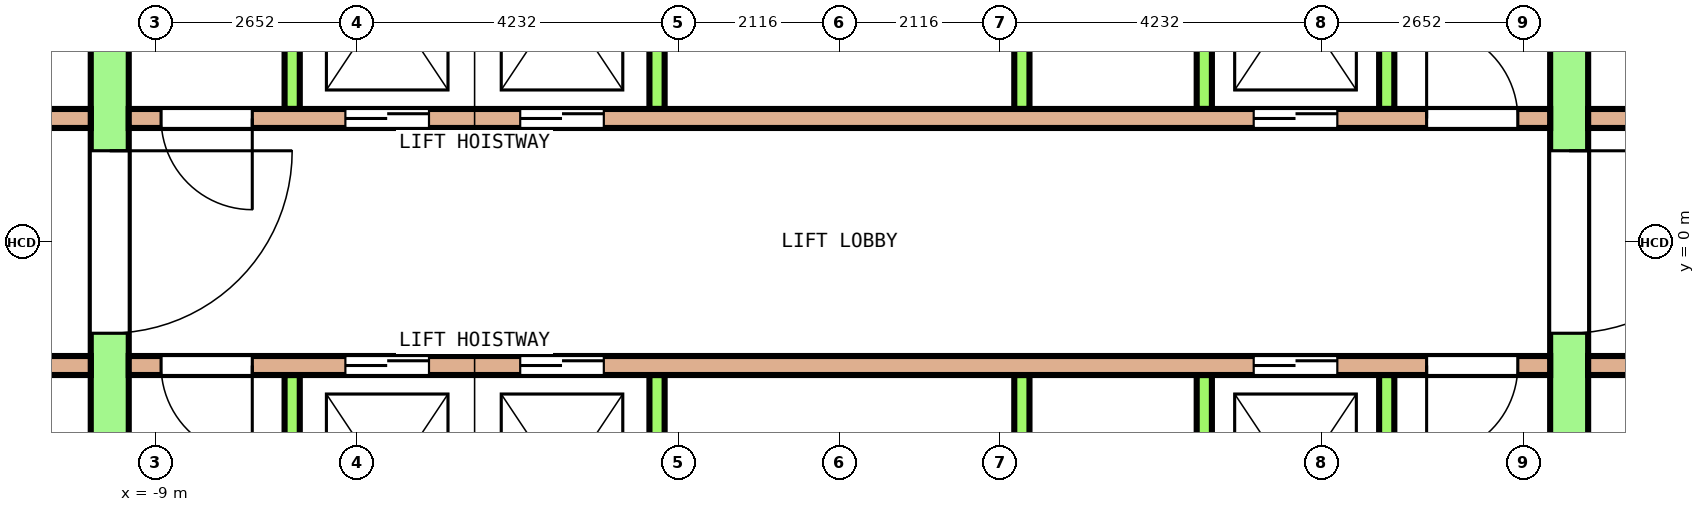
"""IFC4 building model, lengths in metres.
Left out: names, types, materials, properties, quantities, classifications, styles, units other than length and angle.
Written with IfcOpenShell. Run it as: python <this file> out.ifc"""

import sys

from ifc_helpers import new_model, si_unit, direction, frame, frame_2d, origin, place, context, subcontext, project, spatial, rectangle, extrude, element, fill, save


model = new_model("IFC4")
c1 = context("Model", 3, precision=1e-05, world=origin(), true_north=direction((0.0, 1.0)))
c2 = subcontext(c1, "Body", "Model", "MODEL_VIEW")
j1 = project(units=[si_unit("LENGTHUNIT", "METRE"), si_unit("PLANEANGLEUNIT", "RADIAN")], contexts=[c1])
p1 = place(None, origin())
s1 = spatial("IfcSite", under=j1, at=p1, CompositionType="ELEMENT")
p2 = place(p1, origin())
s2 = spatial("IfcBuilding", under=s1, at=p2, CompositionType="ELEMENT")
p3 = place(p2, frame((0.0, 0.0, 202.4)))
s3 = spatial("IfcBuildingStorey", under=s2, at=p3, CompositionType="ELEMENT", Elevation=202.4)
p4 = place(p3, frame((-9.6, -7.8, 0.0), z_axis=(0.0, 0.0, 1.0), x_axis=(0.0, 1.0, 0.0)))
e1 = element("IfcWall", 1, at=p4, inside=s3, PredefinedType="SHEAR", context=c2, shape_type="SweptSolid", body=[
    extrude(rectangle(XDim=15.6, YDim=0.5, at=frame_2d((7.8, 0.0))), origin(), (0.0, 0.0, 1.0), 8.7),
])
p5 = place(p4, frame((6.6, 0.0, 0.0)))
e2 = element("IfcOpeningElement", 2, at=p5, cuts=e1, PredefinedType="OPENING", context=c2, shape_type="SweptSolid", body=[
    extrude(rectangle(XDim=2.4, YDim=2.1, at=frame_2d((1.2, 1.05))), frame((0.0, 0.26, 0.0), z_axis=(0.0, -1.0, 0.0), x_axis=(1.0, 0.0, 0.0)), (0.0, 0.0, 1.0), 0.52),
])
p6 = place(p4, frame((13.5, 0.0, 0.0)))
e3 = element("IfcOpeningElement", 3, at=p6, cuts=e1, PredefinedType="OPENING", context=c2, shape_type="SweptSolid", body=[
    extrude(rectangle(XDim=1.2, YDim=2.1, at=frame_2d((0.6, 1.05))), frame((0.0, 0.26, 0.0), z_axis=(0.0, -1.0, 0.0), x_axis=(1.0, 0.0, 0.0)), (0.0, 0.0, 1.0), 0.52),
])
p7 = place(p4, frame((0.9, 0.0, 0.0)))
e4 = element("IfcOpeningElement", 4, at=p7, cuts=e1, PredefinedType="OPENING", context=c2, shape_type="SweptSolid", body=[
    extrude(rectangle(XDim=1.2, YDim=2.1, at=frame_2d((0.6, 1.05))), frame((0.0, 0.26, 0.0), z_axis=(0.0, -1.0, 0.0), x_axis=(1.0, 0.0, 0.0)), (0.0, 0.0, 1.0), 0.52),
])
p8 = place(p3, frame((9.6, -7.8, 0.0), z_axis=(0.0, 0.0, 1.0), x_axis=(0.0, 1.0, 0.0)))
e5 = element("IfcWall", 5, at=p8, inside=s3, PredefinedType="SHEAR", context=c2, shape_type="SweptSolid", body=[
    extrude(rectangle(XDim=15.6, YDim=0.5, at=frame_2d((7.8, 0.0))), origin(), (0.0, 0.0, 1.0), 8.7),
])
p9 = place(p8, frame((6.6, 0.0, 0.0)))
e6 = element("IfcOpeningElement", 6, at=p9, cuts=e5, PredefinedType="OPENING", context=c2, shape_type="SweptSolid", body=[
    extrude(rectangle(XDim=2.4, YDim=2.1, at=frame_2d((1.2, 1.05))), frame((0.0, 0.26, 0.0), z_axis=(0.0, -1.0, 0.0), x_axis=(1.0, 0.0, 0.0)), (0.0, 0.0, 1.0), 0.52),
])
p10 = place(p8, frame((13.5, 0.0, 0.0)))
e7 = element("IfcOpeningElement", 7, at=p10, cuts=e5, PredefinedType="OPENING", context=c2, shape_type="SweptSolid", body=[
    extrude(rectangle(XDim=1.2, YDim=2.1, at=frame_2d((0.6, 1.05))), frame((0.0, 0.26, 0.0), z_axis=(0.0, -1.0, 0.0), x_axis=(1.0, 0.0, 0.0)), (0.0, 0.0, 1.0), 0.52),
])
p11 = place(p8, frame((1.0, 0.0, 0.0)))
e8 = element("IfcOpeningElement", 8, at=p11, cuts=e5, PredefinedType="OPENING", context=c2, shape_type="SweptSolid", body=[
    extrude(rectangle(XDim=1.0, YDim=2.1, at=frame_2d((0.5, 1.05))), frame((0.0, 0.26, 0.0), z_axis=(0.0, -1.0, 0.0), x_axis=(1.0, 0.0, 0.0)), (0.0, 0.0, 1.0), 0.52),
])
p12 = place(p3, frame((-12.9, 1.625, 0.0), z_axis=(0.0, 0.0, 1.0), x_axis=(1.0, 0.0, 0.0)))
e9 = element("IfcWall", 9, at=p12, inside=s3, PredefinedType="SOLIDWALL", context=c2, shape_type="SweptSolid", body=[
    extrude(rectangle(XDim=3.05, YDim=0.25, at=frame_2d((1.525, 0.0))), origin(), (0.0, 0.0, 1.0), 8.7),
])
p13 = place(p12, frame((0.925, 0.0, 0.0)))
e10 = element("IfcOpeningElement", 10, at=p13, cuts=e9, PredefinedType="OPENING", context=c2, shape_type="SweptSolid", body=[
    extrude(rectangle(XDim=1.2, YDim=2.1, at=frame_2d((0.6, 1.05))), frame((0.0, 0.135, 0.0), z_axis=(0.0, -1.0, 0.0), x_axis=(1.0, 0.0, 0.0)), (0.0, 0.0, 1.0), 0.27),
])
p14 = place(p3, frame((-9.35, 1.625, 0.0), z_axis=(0.0, 0.0, 1.0), x_axis=(1.0, 0.0, 0.0)))
e11 = element("IfcWall", 11, at=p14, inside=s3, PredefinedType="SOLIDWALL", context=c2, shape_type="SweptSolid", body=[
    extrude(rectangle(XDim=18.7, YDim=0.25, at=frame_2d((9.35, 0.0))), origin(), (0.0, 0.0, 1.0), 8.7),
])
p15 = place(p14, frame((2.85, 0.0, 0.0)))
e12 = element("IfcOpeningElement", 12, at=p15, cuts=e11, PredefinedType="OPENING", context=c2, shape_type="SweptSolid", body=[
    extrude(rectangle(XDim=1.1, YDim=2.1, at=frame_2d((0.55, 1.05))), frame((0.0, 0.135, 0.0), z_axis=(0.0, -1.0, 0.0), x_axis=(1.0, 0.0, 0.0)), (0.0, 0.0, 1.0), 0.27),
])
p16 = place(p14, frame((5.15, 0.0, 0.0)))
e13 = element("IfcOpeningElement", 13, at=p16, cuts=e11, PredefinedType="OPENING", context=c2, shape_type="SweptSolid", body=[
    extrude(rectangle(XDim=1.1, YDim=2.1, at=frame_2d((0.55, 1.05))), frame((0.0, 0.135, 0.0), z_axis=(0.0, -1.0, 0.0), x_axis=(1.0, 0.0, 0.0)), (0.0, 0.0, 1.0), 0.27),
])
p17 = place(p14, frame((14.8, 0.0, 0.0)))
e14 = element("IfcOpeningElement", 14, at=p17, cuts=e11, PredefinedType="OPENING", context=c2, shape_type="SweptSolid", body=[
    extrude(rectangle(XDim=1.1, YDim=2.1, at=frame_2d((0.55, 1.05))), frame((0.0, 0.135, 0.0), z_axis=(0.0, -1.0, 0.0), x_axis=(1.0, 0.0, 0.0)), (0.0, 0.0, 1.0), 0.27),
])
p18 = place(p14, frame((0.425, 0.0, 0.0)))
e15 = element("IfcOpeningElement", 15, at=p18, cuts=e11, PredefinedType="OPENING", context=c2, shape_type="SweptSolid", body=[
    extrude(rectangle(XDim=1.2, YDim=2.1, at=frame_2d((0.6, 1.05))), frame((0.0, 0.135, 0.0), z_axis=(0.0, -1.0, 0.0), x_axis=(1.0, 0.0, 0.0)), (0.0, 0.0, 1.0), 0.27),
])
p19 = place(p14, frame((17.075, 0.0, 0.0)))
e16 = element("IfcOpeningElement", 16, at=p19, cuts=e11, PredefinedType="OPENING", context=c2, shape_type="SweptSolid", body=[
    extrude(rectangle(XDim=1.2, YDim=2.1, at=frame_2d((0.6, 1.05))), frame((0.0, 0.135, 0.0), z_axis=(0.0, -1.0, 0.0), x_axis=(1.0, 0.0, 0.0)), (0.0, 0.0, 1.0), 0.27),
])
p20 = place(p3, frame((9.85, 1.625, 0.0), z_axis=(0.0, 0.0, 1.0), x_axis=(1.0, 0.0, 0.0)))
e17 = element("IfcWall", 17, at=p20, inside=s3, PredefinedType="SOLIDWALL", context=c2, shape_type="SweptSolid", body=[
    extrude(rectangle(XDim=3.05, YDim=0.25, at=frame_2d((1.525, 0.0))), origin(), (0.0, 0.0, 1.0), 8.7),
])
p21 = place(p20, frame((0.925, 0.0, 0.0)))
e18 = element("IfcOpeningElement", 18, at=p21, cuts=e17, PredefinedType="OPENING", context=c2, shape_type="SweptSolid", body=[
    extrude(rectangle(XDim=1.2, YDim=2.1, at=frame_2d((0.6, 1.05))), frame((0.0, 0.135, 0.0), z_axis=(0.0, -1.0, 0.0), x_axis=(1.0, 0.0, 0.0)), (0.0, 0.0, 1.0), 0.27),
])
for number, where, z_axis, x_axis in (
    (19, (-7.2, 1.75, 0.0), (0.0, 0.0, 1.0), (0.0, 1.0, 0.0)),
    (20, (-2.4, 1.75, 0.0), (0.0, 0.0, 1.0), (0.0, 1.0, 0.0)),
    (21, (2.4, 1.75, 0.0), (0.0, 0.0, 1.0), (0.0, 1.0, 0.0)),
    (22, (4.8, 1.75, 0.0), (0.0, 0.0, 1.0), (0.0, 1.0, 0.0)),
    (23, (7.2, 1.75, 0.0), (0.0, 0.0, 1.0), (0.0, 1.0, 0.0)),
):
    element("IfcWall", number, at=place(p3, frame(where, z_axis=z_axis, x_axis=x_axis)), inside=s3, PredefinedType="SOLIDWALL", context=c2, shape_type="SweptSolid", body=[
        extrude(rectangle(XDim=2.9, YDim=0.2, at=frame_2d((1.45, 0.0))), origin(), (0.0, 0.0, 1.0), 8.7),
    ])
p22 = place(p3, frame((-12.9, -1.625, 0.0), z_axis=(0.0, 0.0, 1.0), x_axis=(1.0, 0.0, 0.0)))
e24 = element("IfcWall", 24, at=p22, inside=s3, PredefinedType="SOLIDWALL", context=c2, shape_type="SweptSolid", body=[
    extrude(rectangle(XDim=3.05, YDim=0.25, at=frame_2d((1.525, 0.0))), origin(), (0.0, 0.0, 1.0), 8.7),
])
p23 = place(p22, frame((0.925, 0.0, 0.0)))
e25 = element("IfcOpeningElement", 25, at=p23, cuts=e24, PredefinedType="OPENING", context=c2, shape_type="SweptSolid", body=[
    extrude(rectangle(XDim=1.2, YDim=2.1, at=frame_2d((0.6, 1.05))), frame((0.0, 0.135, 0.0), z_axis=(0.0, -1.0, 0.0), x_axis=(1.0, 0.0, 0.0)), (0.0, 0.0, 1.0), 0.27),
])
p24 = place(p3, frame((-9.35, -1.625, 0.0), z_axis=(0.0, 0.0, 1.0), x_axis=(1.0, 0.0, 0.0)))
e26 = element("IfcWall", 26, at=p24, inside=s3, PredefinedType="SOLIDWALL", context=c2, shape_type="SweptSolid", body=[
    extrude(rectangle(XDim=18.7, YDim=0.25, at=frame_2d((9.35, 0.0))), origin(), (0.0, 0.0, 1.0), 8.7),
])
p25 = place(p24, frame((2.85, 0.0, 0.0)))
e27 = element("IfcOpeningElement", 27, at=p25, cuts=e26, PredefinedType="OPENING", context=c2, shape_type="SweptSolid", body=[
    extrude(rectangle(XDim=1.1, YDim=2.1, at=frame_2d((0.55, 1.05))), frame((0.0, 0.135, 0.0), z_axis=(0.0, -1.0, 0.0), x_axis=(1.0, 0.0, 0.0)), (0.0, 0.0, 1.0), 0.27),
])
p26 = place(p24, frame((5.15, 0.0, 0.0)))
e28 = element("IfcOpeningElement", 28, at=p26, cuts=e26, PredefinedType="OPENING", context=c2, shape_type="SweptSolid", body=[
    extrude(rectangle(XDim=1.1, YDim=2.1, at=frame_2d((0.55, 1.05))), frame((0.0, 0.135, 0.0), z_axis=(0.0, -1.0, 0.0), x_axis=(1.0, 0.0, 0.0)), (0.0, 0.0, 1.0), 0.27),
])
p27 = place(p24, frame((14.8, 0.0, 0.0)))
e29 = element("IfcOpeningElement", 29, at=p27, cuts=e26, PredefinedType="OPENING", context=c2, shape_type="SweptSolid", body=[
    extrude(rectangle(XDim=1.1, YDim=2.1, at=frame_2d((0.55, 1.05))), frame((0.0, 0.135, 0.0), z_axis=(0.0, -1.0, 0.0), x_axis=(1.0, 0.0, 0.0)), (0.0, 0.0, 1.0), 0.27),
])
p28 = place(p24, frame((0.425, 0.0, 0.0)))
e30 = element("IfcOpeningElement", 30, at=p28, cuts=e26, PredefinedType="OPENING", context=c2, shape_type="SweptSolid", body=[
    extrude(rectangle(XDim=1.2, YDim=2.1, at=frame_2d((0.6, 1.05))), frame((0.0, 0.135, 0.0), z_axis=(0.0, -1.0, 0.0), x_axis=(1.0, 0.0, 0.0)), (0.0, 0.0, 1.0), 0.27),
])
p29 = place(p24, frame((17.075, 0.0, 0.0)))
e31 = element("IfcOpeningElement", 31, at=p29, cuts=e26, PredefinedType="OPENING", context=c2, shape_type="SweptSolid", body=[
    extrude(rectangle(XDim=1.2, YDim=2.1, at=frame_2d((0.6, 1.05))), frame((0.0, 0.135, 0.0), z_axis=(0.0, -1.0, 0.0), x_axis=(1.0, 0.0, 0.0)), (0.0, 0.0, 1.0), 0.27),
])
p30 = place(p3, frame((9.85, -1.625, 0.0), z_axis=(0.0, 0.0, 1.0), x_axis=(1.0, 0.0, 0.0)))
e32 = element("IfcWall", 32, at=p30, inside=s3, PredefinedType="SOLIDWALL", context=c2, shape_type="SweptSolid", body=[
    extrude(rectangle(XDim=3.05, YDim=0.25, at=frame_2d((1.525, 0.0))), origin(), (0.0, 0.0, 1.0), 8.7),
])
p31 = place(p30, frame((0.925, 0.0, 0.0)))
e33 = element("IfcOpeningElement", 33, at=p31, cuts=e32, PredefinedType="OPENING", context=c2, shape_type="SweptSolid", body=[
    extrude(rectangle(XDim=1.2, YDim=2.1, at=frame_2d((0.6, 1.05))), frame((0.0, 0.135, 0.0), z_axis=(0.0, -1.0, 0.0), x_axis=(1.0, 0.0, 0.0)), (0.0, 0.0, 1.0), 0.27),
])
for number, where, z_axis, x_axis in (
    (34, (-7.2, -4.65, 0.0), (0.0, 0.0, 1.0), (0.0, 1.0, 0.0)),
    (35, (-2.4, -4.65, 0.0), (0.0, 0.0, 1.0), (0.0, 1.0, 0.0)),
    (36, (2.4, -4.65, 0.0), (0.0, 0.0, 1.0), (0.0, 1.0, 0.0)),
    (37, (4.8, -4.65, 0.0), (0.0, 0.0, 1.0), (0.0, 1.0, 0.0)),
    (38, (7.2, -4.65, 0.0), (0.0, 0.0, 1.0), (0.0, 1.0, 0.0)),
):
    element("IfcWall", number, at=place(p3, frame(where, z_axis=z_axis, x_axis=x_axis)), inside=s3, PredefinedType="SOLIDWALL", context=c2, shape_type="SweptSolid", body=[
        extrude(rectangle(XDim=2.9, YDim=0.2, at=frame_2d((1.45, 0.0))), origin(), (0.0, 0.0, 1.0), 8.7),
    ])
p32 = place(p15, origin())
e39 = element("IfcDoor", 39, at=p32, inside=s3, OperationType="DOUBLE_DOOR_SLIDING", PredefinedType="DOOR", context=c2, shape_type="SweptSolid", body=[
    extrude(rectangle(XDim=1.1, YDim=2.1, at=frame_2d((0.55, 1.05))), frame((0.0, 0.075, 0.0), z_axis=(0.0, -1.0, 0.0), x_axis=(1.0, 0.0, 0.0)), (0.0, 0.0, 1.0), 0.15),
])
fill(e12, e39)
p33 = place(p16, origin())
e40 = element("IfcDoor", 40, at=p33, inside=s3, OperationType="DOUBLE_DOOR_SLIDING", PredefinedType="DOOR", context=c2, shape_type="SweptSolid", body=[
    extrude(rectangle(XDim=1.1, YDim=2.1, at=frame_2d((0.55, 1.05))), frame((0.0, 0.075, 0.0), z_axis=(0.0, -1.0, 0.0), x_axis=(1.0, 0.0, 0.0)), (0.0, 0.0, 1.0), 0.15),
])
fill(e13, e40)
p34 = place(p17, origin())
e41 = element("IfcDoor", 41, at=p34, inside=s3, OperationType="DOUBLE_DOOR_SLIDING", PredefinedType="DOOR", context=c2, shape_type="SweptSolid", body=[
    extrude(rectangle(XDim=1.1, YDim=2.1, at=frame_2d((0.55, 1.05))), frame((0.0, 0.075, 0.0), z_axis=(0.0, -1.0, 0.0), x_axis=(1.0, 0.0, 0.0)), (0.0, 0.0, 1.0), 0.15),
])
fill(e14, e41)
p35 = place(p25, origin())
e42 = element("IfcDoor", 42, at=p35, inside=s3, OperationType="DOUBLE_DOOR_SLIDING", PredefinedType="DOOR", context=c2, shape_type="SweptSolid", body=[
    extrude(rectangle(XDim=1.1, YDim=2.1, at=frame_2d((0.55, 1.05))), frame((0.0, 0.075, 0.0), z_axis=(0.0, -1.0, 0.0), x_axis=(1.0, 0.0, 0.0)), (0.0, 0.0, 1.0), 0.15),
])
fill(e27, e42)
p36 = place(p26, origin())
e43 = element("IfcDoor", 43, at=p36, inside=s3, OperationType="DOUBLE_DOOR_SLIDING", PredefinedType="DOOR", context=c2, shape_type="SweptSolid", body=[
    extrude(rectangle(XDim=1.1, YDim=2.1, at=frame_2d((0.55, 1.05))), frame((0.0, 0.075, 0.0), z_axis=(0.0, -1.0, 0.0), x_axis=(1.0, 0.0, 0.0)), (0.0, 0.0, 1.0), 0.15),
])
fill(e28, e43)
p37 = place(p27, origin())
e44 = element("IfcDoor", 44, at=p37, inside=s3, OperationType="DOUBLE_DOOR_SLIDING", PredefinedType="DOOR", context=c2, shape_type="SweptSolid", body=[
    extrude(rectangle(XDim=1.1, YDim=2.1, at=frame_2d((0.55, 1.05))), frame((0.0, 0.075, 0.0), z_axis=(0.0, -1.0, 0.0), x_axis=(1.0, 0.0, 0.0)), (0.0, 0.0, 1.0), 0.15),
])
fill(e29, e44)
p38 = place(p5, origin())
e45 = element("IfcDoor", 45, at=p38, inside=s3, OperationType="DOUBLE_DOOR_SINGLE_SWING", PredefinedType="DOOR", context=c2, shape_type="SweptSolid", body=[
    extrude(rectangle(XDim=2.4, YDim=2.1, at=frame_2d((1.2, 1.05))), frame((0.0, 0.2, 0.0), z_axis=(0.0, -1.0, 0.0), x_axis=(1.0, 0.0, 0.0)), (0.0, 0.0, 1.0), 0.4),
])
fill(e2, e45)
p39 = place(p9, origin())
e46 = element("IfcDoor", 46, at=p39, inside=s3, OperationType="DOUBLE_DOOR_SINGLE_SWING", PredefinedType="DOOR", context=c2, shape_type="SweptSolid", body=[
    extrude(rectangle(XDim=2.4, YDim=2.1, at=frame_2d((1.2, 1.05))), frame((0.0, 0.2, 0.0), z_axis=(0.0, -1.0, 0.0), x_axis=(1.0, 0.0, 0.0)), (0.0, 0.0, 1.0), 0.4),
])
fill(e6, e46)
p40 = place(p18, origin())
e47 = element("IfcDoor", 47, at=p40, inside=s3, OperationType="SINGLE_SWING_LEFT", PredefinedType="DOOR", context=c2, shape_type="SweptSolid", body=[
    extrude(rectangle(XDim=1.2, YDim=2.1, at=frame_2d((0.6, 1.05))), frame((0.0, 0.075, 0.0), z_axis=(0.0, -1.0, 0.0), x_axis=(1.0, 0.0, 0.0)), (0.0, 0.0, 1.0), 0.15),
])
fill(e15, e47)
p41 = place(p19, origin())
e48 = element("IfcDoor", 48, at=p41, inside=s3, OperationType="SINGLE_SWING_RIGHT", PredefinedType="DOOR", context=c2, shape_type="SweptSolid", body=[
    extrude(rectangle(XDim=1.2, YDim=2.1, at=frame_2d((0.6, 1.05))), frame((0.0, 0.075, 0.0), z_axis=(0.0, -1.0, 0.0), x_axis=(1.0, 0.0, 0.0)), (0.0, 0.0, 1.0), 0.15),
])
fill(e16, e48)
p42 = place(p28, origin())
e49 = element("IfcDoor", 49, at=p42, inside=s3, OperationType="SINGLE_SWING_LEFT", PredefinedType="DOOR", context=c2, shape_type="SweptSolid", body=[
    extrude(rectangle(XDim=1.2, YDim=2.1, at=frame_2d((0.6, 1.05))), frame((0.0, 0.075, 0.0), z_axis=(0.0, -1.0, 0.0), x_axis=(1.0, 0.0, 0.0)), (0.0, 0.0, 1.0), 0.15),
])
fill(e30, e49)
p43 = place(p29, origin())
e50 = element("IfcDoor", 50, at=p43, inside=s3, OperationType="SINGLE_SWING_RIGHT", PredefinedType="DOOR", context=c2, shape_type="SweptSolid", body=[
    extrude(rectangle(XDim=1.2, YDim=2.1, at=frame_2d((0.6, 1.05))), frame((0.0, 0.075, 0.0), z_axis=(0.0, -1.0, 0.0), x_axis=(1.0, 0.0, 0.0)), (0.0, 0.0, 1.0), 0.15),
])
fill(e31, e50)
save(model, sys.argv[1])
